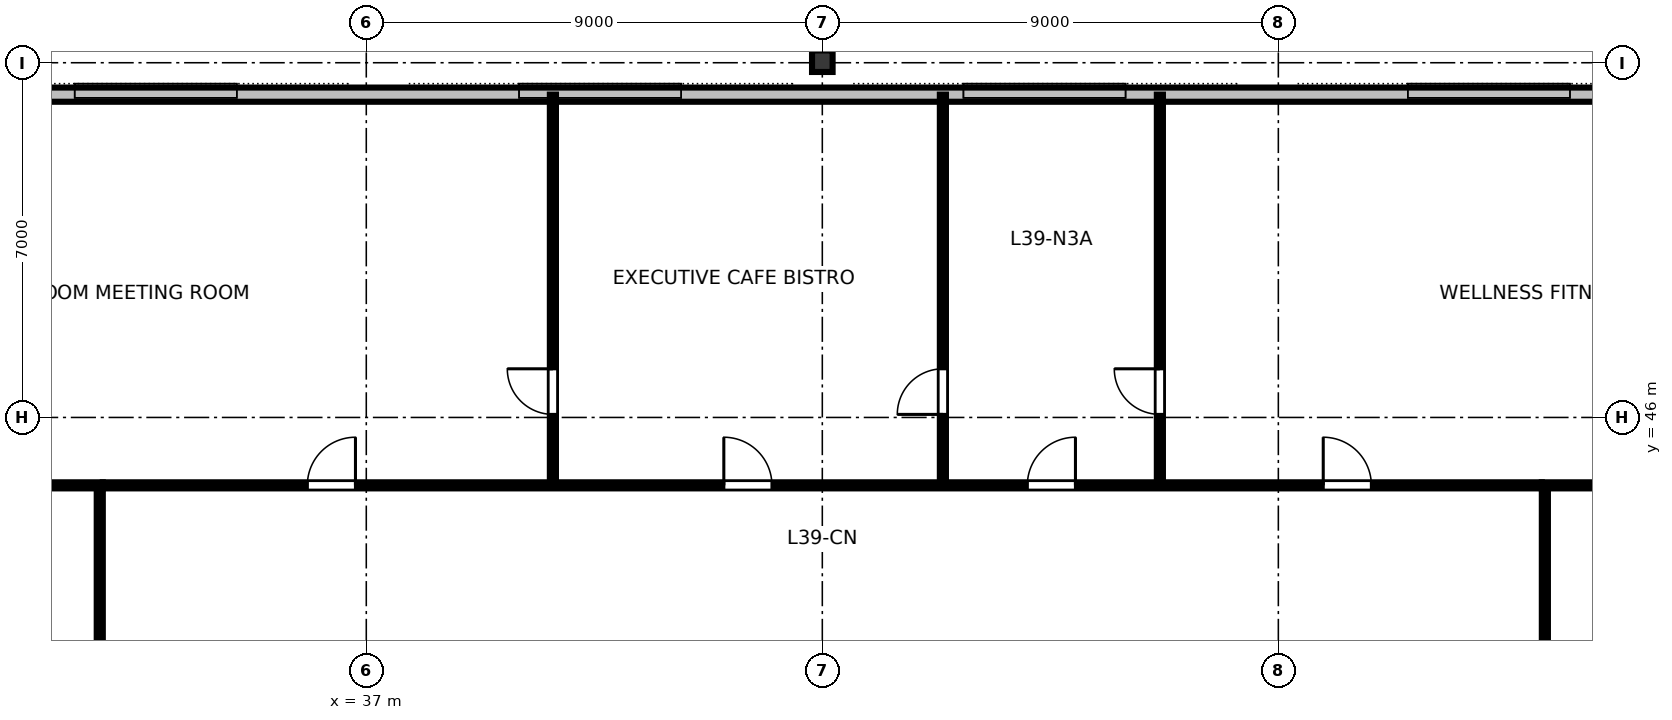
"""IFC4 building model, lengths in metres.
Left out: names, types, materials, properties, quantities, classifications, styles, units other than length and angle.
Written with IfcOpenShell. Run it as: python <this file> out.ifc"""

import sys

from ifc_helpers import new_model, si_unit, direction, frame, frame_2d, origin, origin_2d, place, context, subcontext, project, spatial, rectangle, i_section, extrude, element, fill, save


model = new_model("IFC4")
c1 = context("Model", 3, precision=1e-05, world=origin(), true_north=direction((0.0, 1.0)))
c2 = subcontext(c1, "Body", "Model", "MODEL_VIEW")
j1 = project(units=[si_unit("LENGTHUNIT", "METRE"), si_unit("PLANEANGLEUNIT", "RADIAN")], contexts=[c1])
p1 = place(None, origin())
s1 = spatial("IfcSite", under=j1, at=p1, CompositionType="ELEMENT")
p2 = place(p1, origin())
s2 = spatial("IfcBuilding", under=s1, at=p2, CompositionType="ELEMENT")
p3 = place(p2, frame((0.0, 0.0, 149.2)))
s3 = spatial("IfcBuildingStorey", under=s2, at=p3, CompositionType="ELEMENT", Elevation=149.2)
p4 = place(p3, frame((46.0, 53.03, 0.0), z_axis=(0.0, 0.0, 1.0), x_axis=(1.0, 0.0, 0.0)))
e1 = element("IfcColumn", 1, at=p4, inside=s3, PredefinedType="COLUMN", context=c2, shape_type="SweptSolid", body=[
    extrude(i_section(OverallWidth=0.406, OverallDepth=0.425, WebThickness=0.033, FlangeThickness=0.052, FilletRadius=0.025, at=origin_2d()), origin(), (0.0, 0.0, 1.0), 3.358),
])
p5 = place(p3, frame((64.44, 52.37, 0.0), z_axis=(0.0, 0.0, 1.0), x_axis=(-1.0, 0.0, 0.0)))
e2 = element("IfcWall", 2, at=p5, inside=s3, PredefinedType="STANDARD", context=c2, shape_type="SweptSolid", body=[
    extrude(rectangle(XDim=36.88, YDim=0.28, at=frame_2d((18.44, 0.0))), origin(), (0.0, 0.0, 1.0), 3.36),
])
p6 = place(p3, frame((40.683, 44.66, 0.0), z_axis=(0.0, 0.0, 1.0), x_axis=(0.0, 1.0, 0.0)))
e3 = element("IfcWall", 3, at=p6, inside=s3, PredefinedType="PARTITIONING", context=c2, shape_type="SweptSolid", body=[
    extrude(rectangle(XDim=7.71, YDim=0.12, at=frame_2d((3.855, 0.0))), origin(), (0.0, 0.0, 1.0), 2.64),
])
p7 = place(p6, frame((1.4, 0.0, 0.0)))
e4 = element("IfcOpeningElement", 4, at=p7, cuts=e3, PredefinedType="OPENING", context=c2, shape_type="SweptSolid", body=[
    extrude(rectangle(XDim=0.9, YDim=2.15, at=frame_2d((0.45, 1.075))), frame((0.0, 0.07, 0.0), z_axis=(0.0, -1.0, 0.0), x_axis=(1.0, 0.0, 0.0)), (0.0, 0.0, 1.0), 0.14),
])
p8 = place(p3, frame((48.38, 44.66, 0.0), z_axis=(0.0, 0.0, 1.0), x_axis=(0.0, 1.0, 0.0)))
e5 = element("IfcWall", 5, at=p8, inside=s3, PredefinedType="PARTITIONING", context=c2, shape_type="SweptSolid", body=[
    extrude(rectangle(XDim=7.71, YDim=0.12, at=frame_2d((3.855, 0.0))), origin(), (0.0, 0.0, 1.0), 2.64),
])
p9 = place(p8, frame((1.4, 0.0, 0.0)))
e6 = element("IfcOpeningElement", 6, at=p9, cuts=e5, PredefinedType="OPENING", context=c2, shape_type="SweptSolid", body=[
    extrude(rectangle(XDim=0.9, YDim=2.15, at=frame_2d((0.45, 1.075))), frame((0.0, 0.07, 0.0), z_axis=(0.0, -1.0, 0.0), x_axis=(1.0, 0.0, 0.0)), (0.0, 0.0, 1.0), 0.14),
])
p10 = place(p3, frame((52.662, 44.66, 0.0), z_axis=(0.0, 0.0, 1.0), x_axis=(0.0, 1.0, 0.0)))
e7 = element("IfcWall", 7, at=p10, inside=s3, PredefinedType="PARTITIONING", context=c2, shape_type="SweptSolid", body=[
    extrude(rectangle(XDim=7.71, YDim=0.12, at=frame_2d((3.855, 0.0))), origin(), (0.0, 0.0, 1.0), 2.64),
])
p11 = place(p10, frame((1.4, 0.0, 0.0)))
e8 = element("IfcOpeningElement", 8, at=p11, cuts=e7, PredefinedType="OPENING", context=c2, shape_type="SweptSolid", body=[
    extrude(rectangle(XDim=0.9, YDim=2.15, at=frame_2d((0.45, 1.075))), frame((0.0, 0.07, 0.0), z_axis=(0.0, -1.0, 0.0), x_axis=(1.0, 0.0, 0.0)), (0.0, 0.0, 1.0), 0.14),
])
p12 = place(p3, frame((31.8, 44.66, 0.0), z_axis=(0.0, 0.0, 1.0), x_axis=(1.0, 0.0, 0.0)))
e9 = element("IfcWall", 9, at=p12, inside=s3, PredefinedType="PARTITIONING", context=c2, shape_type="SweptSolid", body=[
    extrude(rectangle(XDim=28.4, YDim=0.12, at=frame_2d((14.2, 0.0))), origin(), (0.0, 0.0, 1.0), 2.64),
])
p13 = place(p12, frame((4.036, 0.0, 0.0)))
e10 = element("IfcOpeningElement", 10, at=p13, cuts=e9, PredefinedType="OPENING", context=c2, shape_type="SweptSolid", body=[
    extrude(rectangle(XDim=0.95, YDim=2.15, at=frame_2d((0.475, 1.075))), frame((0.0, 0.07, 0.0), z_axis=(0.0, -1.0, 0.0), x_axis=(1.0, 0.0, 0.0)), (0.0, 0.0, 1.0), 0.14),
])
p14 = place(p12, frame((12.256, 0.0, 0.0)))
e11 = element("IfcOpeningElement", 11, at=p14, cuts=e9, PredefinedType="OPENING", context=c2, shape_type="SweptSolid", body=[
    extrude(rectangle(XDim=0.95, YDim=2.15, at=frame_2d((0.475, 1.075))), frame((0.0, 0.07, 0.0), z_axis=(0.0, -1.0, 0.0), x_axis=(1.0, 0.0, 0.0)), (0.0, 0.0, 1.0), 0.14),
])
p15 = place(p12, frame((18.246, 0.0, 0.0)))
e12 = element("IfcOpeningElement", 12, at=p15, cuts=e9, PredefinedType="OPENING", context=c2, shape_type="SweptSolid", body=[
    extrude(rectangle(XDim=0.95, YDim=2.15, at=frame_2d((0.475, 1.075))), frame((0.0, 0.07, 0.0), z_axis=(0.0, -1.0, 0.0), x_axis=(1.0, 0.0, 0.0)), (0.0, 0.0, 1.0), 0.14),
])
p16 = place(p12, frame((24.086, 0.0, 0.0)))
e13 = element("IfcOpeningElement", 13, at=p16, cuts=e9, PredefinedType="OPENING", context=c2, shape_type="SweptSolid", body=[
    extrude(rectangle(XDim=0.95, YDim=2.15, at=frame_2d((0.475, 1.075))), frame((0.0, 0.07, 0.0), z_axis=(0.0, -1.0, 0.0), x_axis=(1.0, 0.0, 0.0)), (0.0, 0.0, 1.0), 0.14),
])
p17 = place(p3, frame((31.74, 33.02, 0.0), z_axis=(0.0, 0.0, 1.0), x_axis=(0.0, 1.0, 0.0)))
e14 = element("IfcWall", 14, at=p17, inside=s3, PredefinedType="PARTITIONING", context=c2, shape_type="SweptSolid", body=[
    extrude(rectangle(XDim=11.58, YDim=0.12, at=frame_2d((5.79, 0.0))), origin(), (0.0, 0.0, 1.0), 2.64),
])
p18 = place(p17, frame((1.44, 0.0, 0.0)))
e15 = element("IfcOpeningElement", 15, at=p18, cuts=e14, PredefinedType="OPENING", context=c2, shape_type="SweptSolid", body=[
    extrude(rectangle(XDim=0.95, YDim=2.15, at=frame_2d((0.475, 1.075))), frame((0.0, 0.07, 0.0), z_axis=(0.0, -1.0, 0.0), x_axis=(1.0, 0.0, 0.0)), (0.0, 0.0, 1.0), 0.14),
])
p19 = place(p17, frame((7.13, 0.0, 0.0)))
e16 = element("IfcOpeningElement", 16, at=p19, cuts=e14, PredefinedType="OPENING", context=c2, shape_type="SweptSolid", body=[
    extrude(rectangle(XDim=0.95, YDim=2.15, at=frame_2d((0.475, 1.075))), frame((0.0, 0.07, 0.0), z_axis=(0.0, -1.0, 0.0), x_axis=(1.0, 0.0, 0.0)), (0.0, 0.0, 1.0), 0.14),
])
p20 = place(p3, frame((60.26, 33.02, 0.0), z_axis=(0.0, 0.0, 1.0), x_axis=(0.0, 1.0, 0.0)))
e17 = element("IfcWall", 17, at=p20, inside=s3, PredefinedType="PARTITIONING", context=c2, shape_type="SweptSolid", body=[
    extrude(rectangle(XDim=11.58, YDim=0.12, at=frame_2d((5.79, 0.0))), origin(), (0.0, 0.0, 1.0), 2.64),
])
p21 = place(p20, frame((5.215, 0.0, 0.0)))
e18 = element("IfcOpeningElement", 18, at=p21, cuts=e17, PredefinedType="OPENING", context=c2, shape_type="SweptSolid", body=[
    extrude(rectangle(XDim=0.95, YDim=2.15, at=frame_2d((0.475, 1.075))), frame((0.0, 0.07, 0.0), z_axis=(0.0, -1.0, 0.0), x_axis=(1.0, 0.0, 0.0)), (0.0, 0.0, 1.0), 0.14),
])
for number, where, z_axis, x_axis in (
    (19, (31.8, 44.66, 0.0), (0.0, 0.0, 1.0), (-1.0, 0.0, 0.0)),
    (20, (60.2, 44.66, 0.0), (0.0, 0.0, 1.0), (1.0, 0.0, 0.0)),
):
    element("IfcWall", number, at=place(p3, frame(where, z_axis=z_axis, x_axis=x_axis)), inside=s3, PredefinedType="PARTITIONING", context=c2, shape_type="SweptSolid", body=[
        extrude(rectangle(XDim=8.92, YDim=0.12, at=frame_2d((4.46, 0.0))), origin(), (0.0, 0.0, 1.0), 2.64),
    ])
p22 = place(p7, origin())
e21 = element("IfcDoor", 21, at=p22, inside=s3, OperationType="SINGLE_SWING_RIGHT", PredefinedType="DOOR", context=c2, shape_type="SweptSolid", body=[
    extrude(rectangle(XDim=0.9, YDim=2.15, at=frame_2d((0.45, 1.075))), frame((0.0, 0.025, 0.0), z_axis=(0.0, -1.0, 0.0), x_axis=(1.0, 0.0, 0.0)), (0.0, 0.0, 1.0), 0.05),
])
fill(e4, e21)
p23 = place(p9, origin())
e22 = element("IfcDoor", 22, at=p23, inside=s3, OperationType="SINGLE_SWING_LEFT", PredefinedType="DOOR", context=c2, shape_type="SweptSolid", body=[
    extrude(rectangle(XDim=0.9, YDim=2.15, at=frame_2d((0.45, 1.075))), frame((0.0, 0.025, 0.0), z_axis=(0.0, -1.0, 0.0), x_axis=(1.0, 0.0, 0.0)), (0.0, 0.0, 1.0), 0.05),
])
fill(e6, e22)
p24 = place(p11, origin())
e23 = element("IfcDoor", 23, at=p24, inside=s3, OperationType="SINGLE_SWING_RIGHT", PredefinedType="DOOR", context=c2, shape_type="SweptSolid", body=[
    extrude(rectangle(XDim=0.9, YDim=2.15, at=frame_2d((0.45, 1.075))), frame((0.0, 0.025, 0.0), z_axis=(0.0, -1.0, 0.0), x_axis=(1.0, 0.0, 0.0)), (0.0, 0.0, 1.0), 0.05),
])
fill(e8, e23)
p25 = place(p13, origin())
e24 = element("IfcDoor", 24, at=p25, inside=s3, OperationType="SINGLE_SWING_RIGHT", PredefinedType="DOOR", context=c2, shape_type="SweptSolid", body=[
    extrude(rectangle(XDim=0.95, YDim=2.15, at=frame_2d((0.475, 1.075))), frame((0.0, 0.025, 0.0), z_axis=(0.0, -1.0, 0.0), x_axis=(1.0, 0.0, 0.0)), (0.0, 0.0, 1.0), 0.05),
])
fill(e10, e24)
p26 = place(p14, origin())
e25 = element("IfcDoor", 25, at=p26, inside=s3, OperationType="SINGLE_SWING_LEFT", PredefinedType="DOOR", context=c2, shape_type="SweptSolid", body=[
    extrude(rectangle(XDim=0.95, YDim=2.15, at=frame_2d((0.475, 1.075))), frame((0.0, 0.025, 0.0), z_axis=(0.0, -1.0, 0.0), x_axis=(1.0, 0.0, 0.0)), (0.0, 0.0, 1.0), 0.05),
])
fill(e11, e25)
p27 = place(p15, origin())
e26 = element("IfcDoor", 26, at=p27, inside=s3, OperationType="SINGLE_SWING_RIGHT", PredefinedType="DOOR", context=c2, shape_type="SweptSolid", body=[
    extrude(rectangle(XDim=0.95, YDim=2.15, at=frame_2d((0.475, 1.075))), frame((0.0, 0.025, 0.0), z_axis=(0.0, -1.0, 0.0), x_axis=(1.0, 0.0, 0.0)), (0.0, 0.0, 1.0), 0.05),
])
fill(e12, e26)
p28 = place(p16, origin())
e27 = element("IfcDoor", 27, at=p28, inside=s3, OperationType="SINGLE_SWING_LEFT", PredefinedType="DOOR", context=c2, shape_type="SweptSolid", body=[
    extrude(rectangle(XDim=0.95, YDim=2.15, at=frame_2d((0.475, 1.075))), frame((0.0, 0.025, 0.0), z_axis=(0.0, -1.0, 0.0), x_axis=(1.0, 0.0, 0.0)), (0.0, 0.0, 1.0), 0.05),
])
fill(e13, e27)
save(model, sys.argv[1])
